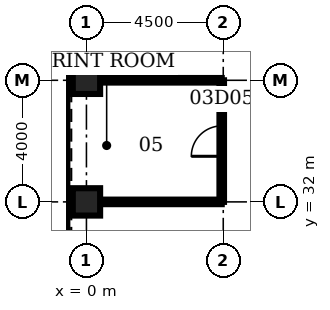
"""IFC4 building model, lengths in metres.
Left out: names, types, materials, properties, quantities, classifications, styles, units other than length and angle.
Written with IfcOpenShell. Run it as: python <this file> out.ifc"""

import sys

from ifc_helpers import new_model, si_unit, direction, frame, frame_2d, origin, origin_2d, place, context, subcontext, project, spatial, rectangle, hollow_rectangle, extrude, element, fill, save


model = new_model("IFC4")
c1 = context("Model", 3, precision=1e-05, world=origin(), true_north=direction((0.0, 1.0)))
c2 = subcontext(c1, "Body", "Model", "MODEL_VIEW")
j1 = project(units=[si_unit("LENGTHUNIT", "METRE"), si_unit("PLANEANGLEUNIT", "RADIAN")], contexts=[c1])
p1 = place(None, origin())
s1 = spatial("IfcSite", under=j1, at=p1, CompositionType="ELEMENT")
p2 = place(p1, origin())
s2 = spatial("IfcBuilding", under=s1, at=p2, CompositionType="ELEMENT")
p3 = place(p2, frame((0.0, 0.0, 18.0)))
s3 = spatial("IfcBuildingStorey", under=s2, at=p3, CompositionType="ELEMENT", Elevation=18.0)
for number, where, z_axis, x_axis in (
    (1, (0.0, 36.0, 0.0), (0.0, 0.0, 1.0), (1.0, 0.0, 0.0)),
    (2, (0.0, 32.0, 0.0), (0.0, 0.0, 1.0), (1.0, 0.0, 0.0)),
):
    element("IfcColumn", number, at=place(p3, frame(where, z_axis=z_axis, x_axis=x_axis)), inside=s3, PredefinedType="COLUMN", context=c2, shape_type="SweptSolid", body=[
        extrude(hollow_rectangle(XDim=0.9, YDim=0.9, WallThickness=0.12, at=origin_2d()), origin(), (0.0, 0.0, 1.0), 5.0),
    ])
for number, where, z_axis, x_axis in (
    (3, (0.45, 32.0, 0.0), (0.0, 0.0, 1.0), (1.0, 0.0, 0.0)),
    (4, (0.45, 36.0, 0.0), (0.0, 0.0, 1.0), (1.0, 0.0, 0.0)),
):
    element("IfcWall", number, at=place(p3, frame(where, z_axis=z_axis, x_axis=x_axis)), inside=s3, PredefinedType="PARTITIONING", context=c2, shape_type="SweptSolid", body=[
        extrude(rectangle(XDim=4.0, YDim=0.15, at=frame_2d((2.0, 0.0))), origin(), (0.0, 0.0, 1.0), 3.0),
    ])
p4 = place(p3, frame((4.45, 32.0, 0.0), z_axis=(0.0, 0.0, 1.0), x_axis=(0.0, 1.0, 0.0)))
e5 = element("IfcWall", 5, at=p4, inside=s3, PredefinedType="PARTITIONING", context=c2, shape_type="SweptSolid", body=[
    extrude(rectangle(XDim=4.0, YDim=0.15, at=frame_2d((2.0, 0.0))), origin(), (0.0, 0.0, 1.0), 3.0),
])
p5 = place(p4, frame((1.5, 0.0, 0.0)))
e6 = element("IfcOpeningElement", 6, at=p5, cuts=e5, PredefinedType="OPENING", context=c2, shape_type="SweptSolid", body=[
    extrude(rectangle(XDim=1.0, YDim=2.1, at=frame_2d((0.5, 1.05))), frame((0.0, 0.085, 0.0), z_axis=(0.0, -1.0, 0.0), x_axis=(1.0, 0.0, 0.0)), (0.0, 0.0, 1.0), 0.17),
])
p6 = place(p5, origin())
e7 = element("IfcDoor", 7, at=p6, inside=s3, OperationType="SINGLE_SWING_LEFT", PredefinedType="DOOR", context=c2, shape_type="SweptSolid", body=[
    extrude(rectangle(XDim=1.0, YDim=2.1, at=frame_2d((0.5, 1.05))), frame((0.0, 0.025, 0.0), z_axis=(0.0, -1.0, 0.0), x_axis=(1.0, 0.0, 0.0)), (0.0, 0.0, 1.0), 0.05),
])
fill(e6, e7)
save(model, sys.argv[1])
